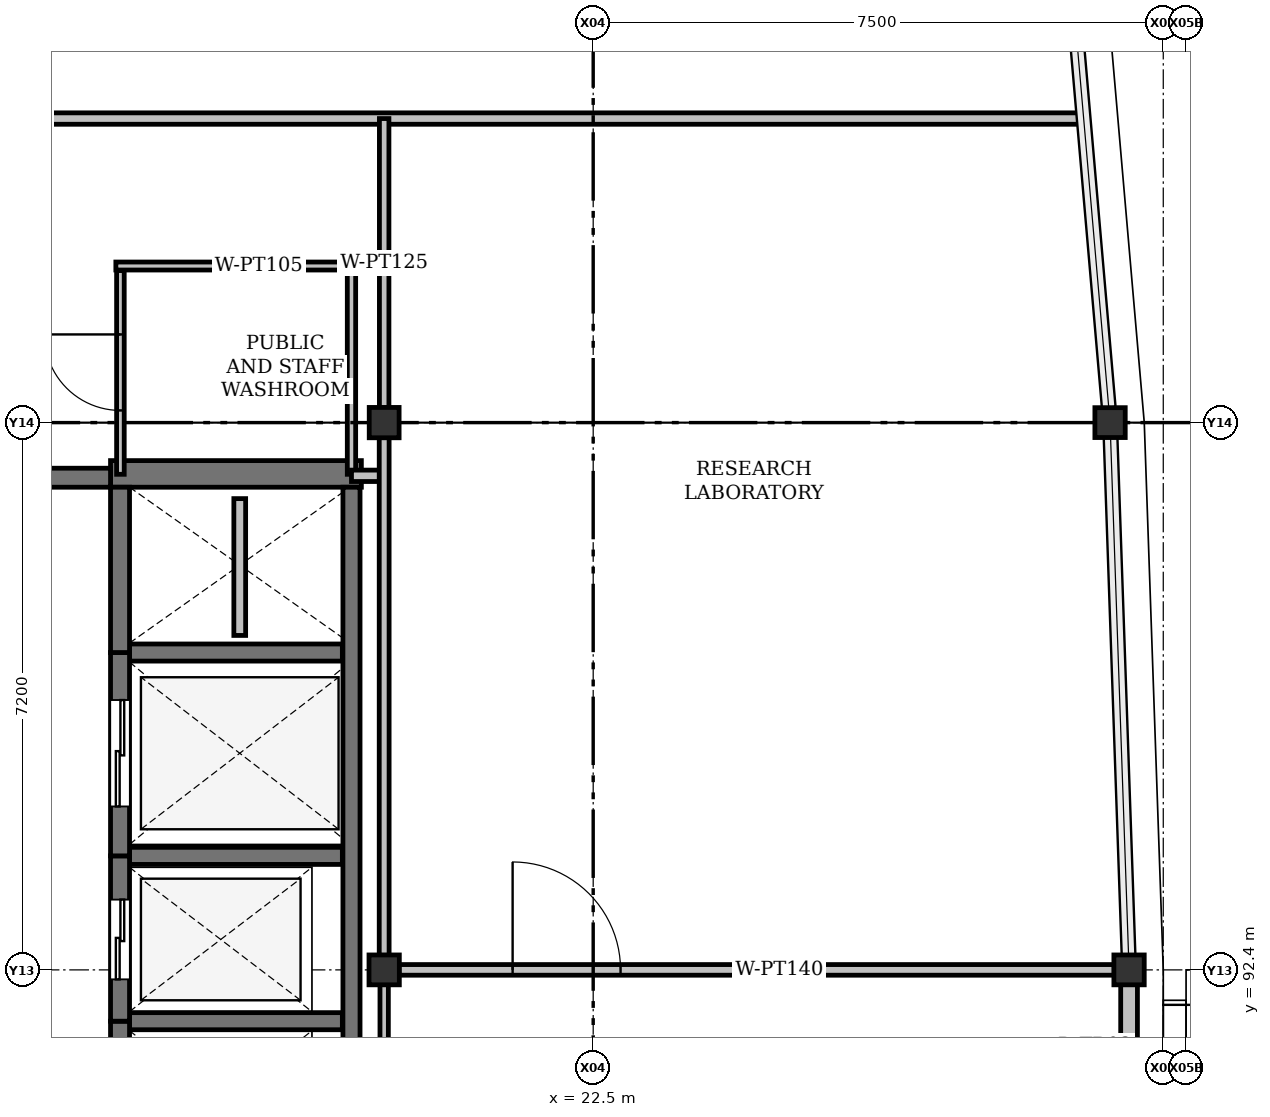
"""IFC4 building model, lengths in metres.
Left out: names, types, materials, properties, quantities, classifications, styles, units other than length and angle.
Written with IfcOpenShell. Run it as: python <this file> out.ifc"""

import sys

from ifc_helpers import new_model, si_unit, direction, frame, frame_2d, origin, origin_2d, place, context, subcontext, project, spatial, rectangle, i_section, extrude, element, fill, save


model = new_model("IFC4")
c1 = context("Model", 3, precision=1e-05, world=origin(), true_north=direction((0.0, 1.0)))
c2 = subcontext(c1, "Body", "Model", "MODEL_VIEW")
j1 = project(units=[si_unit("LENGTHUNIT", "METRE"), si_unit("PLANEANGLEUNIT", "RADIAN")], contexts=[c1])
p1 = place(None, origin())
s1 = spatial("IfcSite", under=j1, at=p1, CompositionType="ELEMENT")
p2 = place(p1, origin())
s2 = spatial("IfcBuilding", under=s1, at=p2, CompositionType="ELEMENT")
p3 = place(p2, frame((0.0, 0.0, 5.4)))
s3 = spatial("IfcBuildingStorey", under=s2, at=p3, CompositionType="ELEMENT", Elevation=5.4)
for number, where, z_axis, x_axis in (
    (1, (19.75, 92.4, 0.0), (0.0, 0.0, 1.0), (1.0, 0.0, 0.0)),
    (2, (29.55, 92.4, 0.0), (0.0, 0.0, 1.0), (1.0, 0.0, 0.0)),
    (3, (19.75, 99.6, 0.0), (0.0, 0.0, 1.0), (0.0, 1.0, 0.0)),
    (4, (29.3, 99.6, 0.0), (0.0, 0.0, 1.0), (1.0, 0.0, 0.0)),
):
    element("IfcColumn", number, at=place(p3, frame(where, z_axis=z_axis, x_axis=x_axis)), inside=s3, PredefinedType="COLUMN", context=c2, shape_type="SweptSolid", body=[
        extrude(i_section(OverallWidth=0.399, OverallDepth=0.393, WebThickness=0.023, FlangeThickness=0.036, FilletRadius=0.015, at=origin_2d()), origin(), (0.0, 0.0, 1.0), 4.5),
    ])
p4 = place(p3, frame((29.55, 92.4, 0.0), z_axis=(0.0, 0.0, 1.0), x_axis=(0.0, -1.0, 0.0)))
e5 = element("IfcWall", 5, at=p4, inside=s3, PredefinedType="SOLIDWALL", context=c2, shape_type="SweptSolid", body=[
    extrude(rectangle(XDim=7.2, YDim=0.22, at=frame_2d((3.6, 0.0))), origin(), (0.0, 0.0, 1.0), 3.847),
])
p5 = place(p4, frame((2.9, 0.0, 0.0)))
e6 = element("IfcOpeningElement", 6, at=p5, cuts=e5, PredefinedType="OPENING", context=c2, shape_type="SweptSolid", body=[
    extrude(rectangle(XDim=1.4, YDim=2.2, at=frame_2d((0.7, 1.1))), frame((0.0, 0.11, 0.0), z_axis=(0.0, -1.0, 0.0), x_axis=(1.0, 0.0, 0.0)), (0.0, 0.0, 1.0), 0.22),
])
p6 = place(p3, frame((16.15, 98.925, 0.0), z_axis=(0.0, 0.0, 1.0), x_axis=(1.0, 0.0, 0.0)))
e7 = element("IfcWall", 7, at=p6, inside=s3, PredefinedType="SHEAR", context=c2, shape_type="SweptSolid", body=[
    extrude(rectangle(XDim=3.3, YDim=0.35, at=frame_2d((1.65, 0.0))), origin(), (0.0, 0.0, 1.0), 4.5),
])
p7 = place(p3, frame((12.12, 98.875, 0.0), z_axis=(0.0, 0.0, 1.0), x_axis=(1.0, 0.0, 0.0)))
e8 = element("IfcWall", 8, at=p7, inside=s3, PredefinedType="SHEAR", context=c2, shape_type="SweptSolid", body=[
    extrude(rectangle(XDim=4.03, YDim=0.25, at=frame_2d((2.015, 0.0))), origin(), (0.0, 0.0, 1.0), 4.5),
])
p8 = place(p7, frame((1.35, 0.0, 0.0)))
e9 = element("IfcOpeningElement", 9, at=p8, cuts=e8, PredefinedType="OPENING", context=c2, shape_type="SweptSolid", body=[
    extrude(rectangle(XDim=1.3, YDim=2.2, at=frame_2d((0.65, 1.1))), frame((0.0, 0.125, 0.0), z_axis=(0.0, -1.0, 0.0), x_axis=(1.0, 0.0, 0.0)), (0.0, 0.0, 1.0), 0.25),
])
p9 = place(p3, frame((19.32, 84.8, 0.0), z_axis=(0.0, 0.0, 1.0), x_axis=(0.0, 1.0, 0.0)))
e10 = element("IfcWall", 10, at=p9, inside=s3, PredefinedType="SHEAR", context=c2, shape_type="SweptSolid", body=[
    extrude(rectangle(XDim=13.95, YDim=0.225, at=frame_2d((6.975, 0.0))), origin(), (0.0, 0.0, 1.0), 4.5),
])
for number, where, z_axis, x_axis in (
    (11, (16.4, 91.725, 0.0), (0.0, 0.0, 1.0), (1.0, 0.0, 0.0)),
    (12, (16.4, 93.9, 0.0), (0.0, 0.0, 1.0), (1.0, 0.0, 0.0)),
    (13, (16.4, 96.575, 0.0), (0.0, 0.0, 1.0), (1.0, 0.0, 0.0)),
):
    element("IfcWall", number, at=place(p3, frame(where, z_axis=z_axis, x_axis=x_axis)), inside=s3, PredefinedType="SHEAR", context=c2, shape_type="SweptSolid", body=[
        extrude(rectangle(XDim=2.8, YDim=0.225, at=frame_2d((1.4, 0.0))), origin(), (0.0, 0.0, 1.0), 4.5),
    ])
p10 = place(p3, frame((16.275, 89.325, 0.0), z_axis=(0.0, 0.0, 1.0), x_axis=(0.0, 1.0, 0.0)))
e14 = element("IfcWall", 14, at=p10, inside=s3, PredefinedType="SHEAR", context=c2, shape_type="SweptSolid", body=[
    extrude(rectangle(XDim=2.4, YDim=0.25, at=frame_2d((1.2, 0.0))), origin(), (0.0, 0.0, 1.0), 4.5),
])
p11 = place(p10, frame((0.8, 0.0, 0.0)))
e15 = element("IfcOpeningElement", 15, at=p11, cuts=e14, PredefinedType="OPENING", context=c2, shape_type="SweptSolid", body=[
    extrude(rectangle(XDim=1.05, YDim=2.15, at=frame_2d((0.525, 1.075))), frame((0.0, 0.125, 0.0), z_axis=(0.0, -1.0, 0.0), x_axis=(1.0, 0.0, 0.0)), (0.0, 0.0, 1.0), 0.25),
])
p12 = place(p3, frame((16.275, 91.725, 0.0), z_axis=(0.0, 0.0, 1.0), x_axis=(0.0, 1.0, 0.0)))
e16 = element("IfcWall", 16, at=p12, inside=s3, PredefinedType="SHEAR", context=c2, shape_type="SweptSolid", body=[
    extrude(rectangle(XDim=2.175, YDim=0.25, at=frame_2d((1.087, 0.0))), origin(), (0.0, 0.0, 1.0), 4.5),
])
p13 = place(p12, frame((0.55, 0.0, 0.0)))
e17 = element("IfcOpeningElement", 17, at=p13, cuts=e16, PredefinedType="OPENING", context=c2, shape_type="SweptSolid", body=[
    extrude(rectangle(XDim=1.05, YDim=2.15, at=frame_2d((0.525, 1.075))), frame((0.0, 0.125, 0.0), z_axis=(0.0, -1.0, 0.0), x_axis=(1.0, 0.0, 0.0)), (0.0, 0.0, 1.0), 0.25),
])
p14 = place(p3, frame((16.275, 93.9, 0.0), z_axis=(0.0, 0.0, 1.0), x_axis=(0.0, 1.0, 0.0)))
e18 = element("IfcWall", 18, at=p14, inside=s3, PredefinedType="SHEAR", context=c2, shape_type="SweptSolid", body=[
    extrude(rectangle(XDim=2.675, YDim=0.25, at=frame_2d((1.337, 0.0))), origin(), (0.0, 0.0, 1.0), 4.5),
])
p15 = place(p14, frame((0.65, 0.0, 0.0)))
e19 = element("IfcOpeningElement", 19, at=p15, cuts=e18, PredefinedType="OPENING", context=c2, shape_type="SweptSolid", body=[
    extrude(rectangle(XDim=1.4, YDim=2.25, at=frame_2d((0.7, 1.125))), frame((0.0, 0.125, 0.0), z_axis=(0.0, -1.0, 0.0), x_axis=(1.0, 0.0, 0.0)), (0.0, 0.0, 1.0), 0.25),
])
p16 = place(p3, frame((16.275, 96.575, 0.0), z_axis=(0.0, 0.0, 1.0), x_axis=(0.0, 1.0, 0.0)))
e20 = element("IfcWall", 20, at=p16, inside=s3, PredefinedType="SHEAR", context=c2, shape_type="SweptSolid", body=[
    extrude(rectangle(XDim=2.175, YDim=0.25, at=frame_2d((1.087, 0.0))), origin(), (0.0, 0.0, 1.0), 4.5),
])
p17 = place(p3, frame((17.85, 96.8, 0.0), z_axis=(0.0, 0.0, 1.0), x_axis=(0.0, 1.0, 0.0)))
e21 = element("IfcWall", 21, at=p17, inside=s3, PredefinedType="PLUMBINGWALL", context=c2, shape_type="SweptSolid", body=[
    extrude(rectangle(XDim=1.8, YDim=0.155, at=frame_2d((0.9, 0.0))), origin(), (0.0, 0.0, 1.0), 4.5),
])
p18 = place(p3, frame((19.32, 98.92, 0.0), z_axis=(0.0, 0.0, 1.0), x_axis=(0.0, 1.0, 0.0)))
e22 = element("IfcWall", 22, at=p18, inside=s3, PredefinedType="PARTITIONING", context=c2, shape_type="SweptSolid", body=[
    extrude(rectangle(XDim=2.74, YDim=0.11, at=frame_2d((1.37, 0.0))), origin(), (0.0, 0.0, 1.0), 3.721),
])
p19 = place(p3, frame((19.38, 101.66, 0.0), z_axis=(0.0, 0.0, 1.0), x_axis=(-1.0, 0.0, 0.0)))
e23 = element("IfcWall", 23, at=p19, inside=s3, PredefinedType="PARTITIONING", context=c2, shape_type="SweptSolid", body=[
    extrude(rectangle(XDim=3.16, YDim=0.105, at=frame_2d((1.58, 0.0))), origin(), (0.0, 0.0, 1.0), 4.25),
])
p20 = place(p3, frame((16.28, 98.92, 0.0), z_axis=(0.0, 0.0, 1.0), x_axis=(0.0, 1.0, 0.0)))
e24 = element("IfcWall", 24, at=p20, inside=s3, PredefinedType="PARTITIONING", context=c2, shape_type="SweptSolid", body=[
    extrude(rectangle(XDim=2.68, YDim=0.1, at=frame_2d((1.34, 0.0))), origin(), (0.0, 0.0, 1.0), 3.721),
])
p21 = place(p20, frame((0.84, 0.0, 0.0)))
e25 = element("IfcOpeningElement", 25, at=p21, cuts=e24, PredefinedType="OPENING", context=c2, shape_type="SweptSolid", body=[
    extrude(rectangle(XDim=1.0, YDim=2.15, at=frame_2d((0.5, 1.075))), frame((0.0, 0.05, 0.0), z_axis=(0.0, -1.0, 0.0), x_axis=(1.0, 0.0, 0.0)), (0.0, 0.0, 1.0), 0.1),
])
p22 = place(p3, frame((19.75, 98.9, 0.0), z_axis=(0.0, 0.0, 1.0), x_axis=(-1.0, 0.0, 0.0)))
e26 = element("IfcWall", 26, at=p22, inside=s3, PredefinedType="PARTITIONING", context=c2, shape_type="SweptSolid", body=[
    extrude(rectangle(XDim=0.43, YDim=0.15, at=frame_2d((0.215, 0.0))), origin(), (0.0, 0.0, 1.0), 3.797),
])
p23 = place(p3, frame((0.65, 103.6, 0.0), z_axis=(0.0, 0.0, 1.0), x_axis=(1.0, 0.0, 0.0)))
e27 = element("IfcWall", 27, at=p23, inside=s3, PredefinedType="PARTITIONING", context=c2, shape_type="SweptSolid", body=[
    extrude(rectangle(XDim=28.265, YDim=0.15, at=frame_2d((14.133, 0.0))), origin(), (0.0, 0.0, 1.0), 3.797),
])
p24 = place(p23, frame((9.27, 0.0, 0.0)))
e28 = element("IfcOpeningElement", 28, at=p24, cuts=e27, PredefinedType="OPENING", context=c2, shape_type="SweptSolid", body=[
    extrude(rectangle(XDim=1.36, YDim=2.25, at=frame_2d((0.68, 1.125))), frame((0.0, 0.075, 0.0), z_axis=(0.0, -1.0, 0.0), x_axis=(1.0, 0.0, 0.0)), (0.0, 0.0, 1.0), 0.15),
])
p25 = place(p23, frame((11.48, 0.0, 0.92)))
e29 = element("IfcOpeningElement", 29, at=p25, cuts=e27, PredefinedType="OPENING", context=c2, shape_type="SweptSolid", body=[
    extrude(rectangle(XDim=0.85, YDim=1.1, at=frame_2d((0.425, 0.55))), frame((0.0, 0.075, 0.0), z_axis=(0.0, -1.0, 0.0), x_axis=(1.0, 0.0, 0.0)), (0.0, 0.0, 1.0), 0.15),
])
p26 = place(p3, frame((19.945, 92.4, 0.0), z_axis=(0.0, 0.0, 1.0), x_axis=(1.0, 0.0, 0.0)))
e30 = element("IfcWall", 30, at=p26, inside=s3, PredefinedType="PARTITIONING", context=c2, shape_type="SweptSolid", body=[
    extrude(rectangle(XDim=9.411, YDim=0.14, at=frame_2d((4.706, 0.0))), origin(), (0.0, 0.0, 1.0), 3.721),
])
p27 = place(p26, frame((1.496, 0.0, 0.0)))
e31 = element("IfcOpeningElement", 31, at=p27, cuts=e30, PredefinedType="OPENING", context=c2, shape_type="SweptSolid", body=[
    extrude(rectangle(XDim=1.42, YDim=2.3, at=frame_2d((0.71, 1.15))), frame((0.0, 0.07, 0.0), z_axis=(0.0, -1.0, 0.0), x_axis=(1.0, 0.0, 0.0)), (0.0, 0.0, 1.0), 0.14),
])
p28 = place(p3, frame((19.75, 99.406, 0.0), z_axis=(0.0, 0.0, 1.0), x_axis=(0.0, -1.0, 0.0)))
e32 = element("IfcWall", 32, at=p28, inside=s3, PredefinedType="PARTITIONING", context=c2, shape_type="SweptSolid", body=[
    extrude(rectangle(XDim=6.814, YDim=0.13, at=frame_2d((3.407, 0.0))), origin(), (0.0, 0.0, 1.0), 3.797),
])
p29 = place(p3, frame((19.75, 103.6, 0.0), z_axis=(0.0, 0.0, 1.0), x_axis=(0.0, -1.0, 0.0)))
e33 = element("IfcWall", 33, at=p29, inside=s3, PredefinedType="PARTITIONING", context=c2, shape_type="SweptSolid", body=[
    extrude(rectangle(XDim=3.806, YDim=0.125, at=frame_2d((1.903, 0.0))), origin(), (0.0, 0.0, 1.0), 3.797),
])
p30 = place(p3, frame((19.75, 85.395, 0.0), z_axis=(0.0, 0.0, 1.0), x_axis=(0.0, 1.0, 0.0)))
e34 = element("IfcWall", 34, at=p30, inside=s3, PredefinedType="PARTITIONING", context=c2, shape_type="SweptSolid", body=[
    extrude(rectangle(XDim=6.814, YDim=0.11, at=frame_2d((3.407, 0.0))), origin(), (0.0, 0.0, 1.0), 3.797),
])
p31 = place(p13, origin())
e35 = element("IfcDoor", 35, at=p31, inside=s3, OperationType="SLIDING_TO_LEFT", PredefinedType="DOOR", context=c2, shape_type="SweptSolid", body=[
    extrude(rectangle(XDim=1.05, YDim=2.15, at=frame_2d((0.525, 1.075))), frame((0.0, 0.025, 0.0), z_axis=(0.0, -1.0, 0.0), x_axis=(1.0, 0.0, 0.0)), (0.0, 0.0, 1.0), 0.05),
])
fill(e17, e35)
p32 = place(p15, origin())
e36 = element("IfcDoor", 36, at=p32, inside=s3, OperationType="SLIDING_TO_LEFT", PredefinedType="DOOR", context=c2, shape_type="SweptSolid", body=[
    extrude(rectangle(XDim=1.4, YDim=2.25, at=frame_2d((0.7, 1.125))), frame((0.0, 0.025, 0.0), z_axis=(0.0, -1.0, 0.0), x_axis=(1.0, 0.0, 0.0)), (0.0, 0.0, 1.0), 0.05),
])
fill(e19, e36)
p33 = place(p21, origin())
e37 = element("IfcDoor", 37, at=p33, inside=s3, OperationType="SINGLE_SWING_RIGHT", PredefinedType="DOOR", context=c2, shape_type="SweptSolid", body=[
    extrude(rectangle(XDim=1.0, YDim=2.15, at=frame_2d((0.5, 1.075))), frame((0.0, 0.025, 0.0), z_axis=(0.0, -1.0, 0.0), x_axis=(1.0, 0.0, 0.0)), (0.0, 0.0, 1.0), 0.05),
])
fill(e25, e37)
p34 = place(p27, origin())
e38 = element("IfcDoor", 38, at=p34, inside=s3, OperationType="SINGLE_SWING_LEFT", PredefinedType="DOOR", context=c2, shape_type="SweptSolid", body=[
    extrude(rectangle(XDim=1.42, YDim=2.3, at=frame_2d((0.71, 1.15))), frame((0.0, 0.025, 0.0), z_axis=(0.0, -1.0, 0.0), x_axis=(1.0, 0.0, 0.0)), (0.0, 0.0, 1.0), 0.05),
])
fill(e31, e38)
save(model, sys.argv[1])
